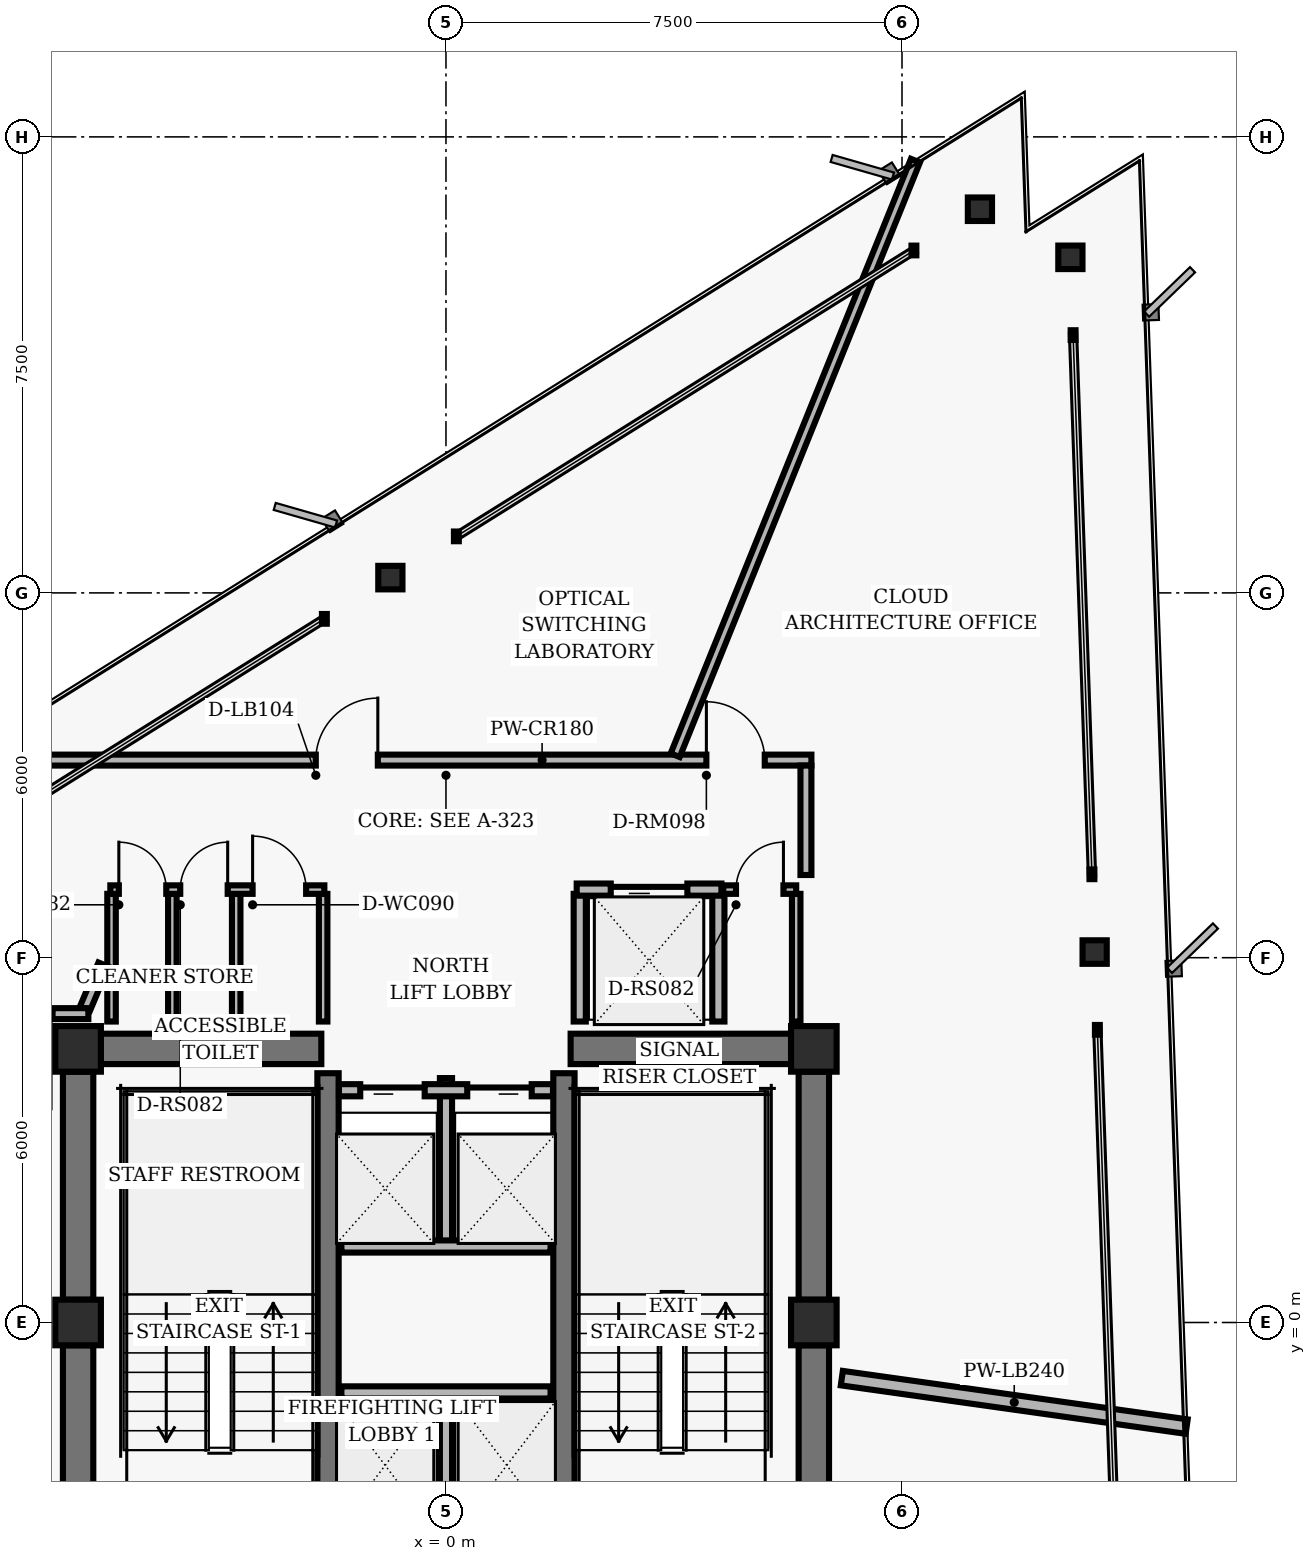
"""IFC4 building model, lengths in metres.
Left out: names, types, materials, properties, quantities, classifications, styles, units other than length and angle.
Written with IfcOpenShell. Run it as: python <this file> out.ifc"""

import sys

from ifc_helpers import new_model, si_unit, direction, frame, frame_2d, origin, origin_2d, place, context, subcontext, project, spatial, rectangle, hollow_rectangle, i_section, extrude, element, fill, save


model = new_model("IFC4")
c1 = context("Model", 3, precision=1e-05, world=origin(), true_north=direction((0.0, 1.0)))
c2 = subcontext(c1, "Body", "Model", "MODEL_VIEW")
j1 = project(units=[si_unit("LENGTHUNIT", "METRE"), si_unit("PLANEANGLEUNIT", "RADIAN")], contexts=[c1])
p1 = place(None, origin())
s1 = spatial("IfcSite", under=j1, at=p1, CompositionType="ELEMENT")
p2 = place(p1, origin())
s2 = spatial("IfcBuilding", under=s1, at=p2, CompositionType="ELEMENT")
p3 = place(p2, frame((0.0, 0.0, 202.72)))
s3 = spatial("IfcBuildingStorey", under=s2, at=p3, CompositionType="ELEMENT", Elevation=202.72)
for number, where, z_axis, x_axis in (
    (1, (-6.05, 4.5, 0.0), (0.0, 0.0, 1.0), (1.0, 0.0, 0.0)),
    (2, (6.05, 4.5, 0.0), (0.0, 0.0, 1.0), (1.0, 0.0, 0.0)),
    (3, (-6.05, 0.0, 0.0), (0.0, 0.0, 1.0), (1.0, 0.0, 0.0)),
    (4, (6.05, 0.0, 0.0), (0.0, 0.0, 1.0), (1.0, 0.0, 0.0)),
):
    element("IfcColumn", number, at=place(p3, frame(where, z_axis=z_axis, x_axis=x_axis)), inside=s3, PredefinedType="COLUMN", context=c2, shape_type="SweptSolid", body=[
        extrude(hollow_rectangle(XDim=0.75, YDim=0.75, WallThickness=0.05, InnerFilletRadius=0.02, OuterFilletRadius=0.04, at=origin_2d()), origin(), (0.0, 0.0, 1.0), 3.04),
    ])
p4 = place(p3, frame((-6.05, 0.375, 0.0), z_axis=(0.0, 0.0, 1.0), x_axis=(0.0, 1.0, 0.0)))
e5 = element("IfcWall", 5, at=p4, inside=s3, PredefinedType="SHEAR", context=c2, shape_type="SweptSolid", body=[
    extrude(rectangle(XDim=3.75, YDim=0.5, at=frame_2d((1.875, 0.0))), origin(), (0.0, 0.0, 1.0), 2.798),
])
p5 = place(p3, frame((-6.05, -3.925, 0.0), z_axis=(0.0, 0.0, 1.0), x_axis=(0.0, 1.0, 0.0)))
e6 = element("IfcWall", 6, at=p5, inside=s3, PredefinedType="SHEAR", context=c2, shape_type="SweptSolid", body=[
    extrude(rectangle(XDim=3.55, YDim=0.5, at=frame_2d((1.775, 0.0))), origin(), (0.0, 0.0, 1.0), 2.798),
])
p6 = place(p3, frame((6.05, 0.375, 0.0), z_axis=(0.0, 0.0, 1.0), x_axis=(0.0, 1.0, 0.0)))
e7 = element("IfcWall", 7, at=p6, inside=s3, PredefinedType="SHEAR", context=c2, shape_type="SweptSolid", body=[
    extrude(rectangle(XDim=3.75, YDim=0.5, at=frame_2d((1.875, 0.0))), origin(), (0.0, 0.0, 1.0), 2.798),
])
p7 = place(p3, frame((6.05, -3.925, 0.0), z_axis=(0.0, 0.0, 1.0), x_axis=(0.0, 1.0, 0.0)))
e8 = element("IfcWall", 8, at=p7, inside=s3, PredefinedType="SHEAR", context=c2, shape_type="SweptSolid", body=[
    extrude(rectangle(XDim=3.55, YDim=0.5, at=frame_2d((1.775, 0.0))), origin(), (0.0, 0.0, 1.0), 2.798),
])
for number, where, z_axis, x_axis in (
    (9, (-1.94, -4.1, 0.0), (0.0, 0.0, 1.0), (0.0, 1.0, 0.0)),
    (10, (1.94, -4.1, 0.0), (0.0, 0.0, 1.0), (0.0, 1.0, 0.0)),
):
    element("IfcWall", number, at=place(p3, frame(where, z_axis=z_axis, x_axis=x_axis)), inside=s3, PredefinedType="SHEAR", context=c2, shape_type="SweptSolid", body=[
        extrude(rectangle(XDim=8.2, YDim=0.35, at=frame_2d((4.1, 0.0))), origin(), (0.0, 0.0, 1.0), 2.798),
    ])
for number, where, z_axis, x_axis in (
    (11, (-5.675, 4.5, 0.0), (0.0, 0.0, 1.0), (1.0, 0.0, 0.0)),
    (12, (2.05, 4.5, 0.0), (0.0, 0.0, 1.0), (1.0, 0.0, 0.0)),
):
    element("IfcWall", number, at=place(p3, frame(where, z_axis=z_axis, x_axis=x_axis)), inside=s3, PredefinedType="SHEAR", context=c2, shape_type="SweptSolid", body=[
        extrude(rectangle(XDim=3.625, YDim=0.5, at=frame_2d((1.812, 0.0))), origin(), (0.0, 0.0, 1.0), 2.798),
    ])
for number, where, z_axis, x_axis in (
    (13, (10.668, 6.093, 0.0), (0.0, 0.0, 1.0), (1.0, 0.0, 0.0)),
    (14, (10.269, 17.519, 0.0), (0.0, 0.0, 1.0), (1.0, 0.0, 0.0)),
    (15, (8.781, 18.31, 0.0), (0.0, 0.0, 1.0), (1.0, 0.0, 0.0)),
    (16, (-0.915, 12.251, 0.0), (0.0, 0.0, 1.0), (1.0, 0.0, 0.0)),
):
    element("IfcColumn", number, at=place(p3, frame(where, z_axis=z_axis, x_axis=x_axis)), inside=s3, PredefinedType="COLUMN", context=c2, shape_type="SweptSolid", body=[
        extrude(i_section(OverallWidth=0.398, OverallDepth=0.387, WebThickness=0.021, FlangeThickness=0.033, FilletRadius=0.018, at=origin_2d()), origin(), (0.0, 0.0, 1.0), 3.04),
    ])
p8 = place(p3, frame((0.0, -3.82, 0.0), z_axis=(0.0, 0.0, 1.0), x_axis=(0.0, 1.0, 0.0)))
e17 = element("IfcWall", 17, at=p8, inside=s3, PredefinedType="PARTITIONING", context=c2, shape_type="SweptSolid", body=[
    extrude(rectangle(XDim=2.67, YDim=0.2, at=frame_2d((1.335, 0.0))), origin(), (0.0, 0.0, 1.0), 2.773),
])
p9 = place(p3, frame((-1.72, -1.15, 0.0), z_axis=(0.0, 0.0, 1.0), x_axis=(1.0, 0.0, 0.0)))
e18 = element("IfcWall", 18, at=p9, inside=s3, PredefinedType="PARTITIONING", context=c2, shape_type="SweptSolid", body=[
    extrude(rectangle(XDim=3.44, YDim=0.2, at=frame_2d((1.72, 0.0))), origin(), (0.0, 0.0, 1.0), 2.773),
])
p10 = place(p3, frame((0.0, 1.25, 0.0), z_axis=(0.0, 0.0, 1.0), x_axis=(0.0, 1.0, 0.0)))
e19 = element("IfcWall", 19, at=p10, inside=s3, PredefinedType="PARTITIONING", context=c2, shape_type="SweptSolid", body=[
    extrude(rectangle(XDim=2.77, YDim=0.2, at=frame_2d((1.385, 0.0))), origin(), (0.0, 0.0, 1.0), 2.773),
])
p11 = place(p3, frame((-1.72, 1.25, 0.0), z_axis=(0.0, 0.0, 1.0), x_axis=(1.0, 0.0, 0.0)))
e20 = element("IfcWall", 20, at=p11, inside=s3, PredefinedType="PARTITIONING", context=c2, shape_type="SweptSolid", body=[
    extrude(rectangle(XDim=3.44, YDim=0.2, at=frame_2d((1.72, 0.0))), origin(), (0.0, 0.0, 1.0), 2.773),
])
p12 = place(p3, frame((-1.76, 3.82, 0.0), z_axis=(0.0, 0.0, 1.0), x_axis=(1.0, 0.0, 0.0)))
e21 = element("IfcWall", 21, at=p12, inside=s3, PredefinedType="PARTITIONING", context=c2, shape_type="SweptSolid", body=[
    extrude(rectangle(XDim=3.52, YDim=0.2, at=frame_2d((1.76, 0.0))), origin(), (0.0, 0.0, 1.0), 2.773),
])
p13 = place(p12, frame((0.35, 0.0, 0.0)))
e22 = element("IfcOpeningElement", 22, at=p13, cuts=e21, PredefinedType="OPENING", context=c2, shape_type="SweptSolid", body=[
    extrude(rectangle(XDim=1.06, YDim=2.04, at=frame_2d((0.53, 1.02))), frame((0.0, 0.11, 0.0), z_axis=(0.0, -1.0, 0.0), x_axis=(1.0, 0.0, 0.0)), (0.0, 0.0, 1.0), 0.22),
])
p14 = place(p12, frame((2.11, 0.0, 0.0)))
e23 = element("IfcOpeningElement", 23, at=p14, cuts=e21, PredefinedType="OPENING", context=c2, shape_type="SweptSolid", body=[
    extrude(rectangle(XDim=1.06, YDim=2.04, at=frame_2d((0.53, 1.02))), frame((0.0, 0.11, 0.0), z_axis=(0.0, -1.0, 0.0), x_axis=(1.0, 0.0, 0.0)), (0.0, 0.0, 1.0), 0.22),
])
for number, where, z_axis, x_axis in (
    (24, (2.2, 4.95, 0.0), (0.0, 0.0, 1.0), (0.0, 1.0, 0.0)),
    (25, (4.48, 4.95, 0.0), (0.0, 0.0, 1.0), (0.0, 1.0, 0.0)),
):
    element("IfcWall", number, at=place(p3, frame(where, z_axis=z_axis, x_axis=x_axis)), inside=s3, PredefinedType="PARTITIONING", context=c2, shape_type="SweptSolid", body=[
        extrude(rectangle(XDim=2.1, YDim=0.2, at=frame_2d((1.05, 0.0))), origin(), (0.0, 0.0, 1.0), 2.773),
    ])
p15 = place(p3, frame((2.15, 7.12, 0.0), z_axis=(0.0, 0.0, 1.0), x_axis=(1.0, 0.0, 0.0)))
e26 = element("IfcWall", 26, at=p15, inside=s3, PredefinedType="PARTITIONING", context=c2, shape_type="SweptSolid", body=[
    extrude(rectangle(XDim=2.38, YDim=0.2, at=frame_2d((1.19, 0.0))), origin(), (0.0, 0.0, 1.0), 2.773),
])
p16 = place(p15, frame((0.56, 0.0, 0.0)))
e27 = element("IfcOpeningElement", 27, at=p16, cuts=e26, PredefinedType="OPENING", context=c2, shape_type="SweptSolid", body=[
    extrude(rectangle(XDim=1.26, YDim=2.06, at=frame_2d((0.63, 1.03))), frame((0.0, 0.11, 0.0), z_axis=(0.0, -1.0, 0.0), x_axis=(1.0, 0.0, 0.0)), (0.0, 0.0, 1.0), 0.22),
])
for number, where, z_axis, x_axis in (
    (28, (-5.5, 4.95, 0.0), (0.0, 0.0, 1.0), (0.0, 1.0, 0.0)),
    (29, (-4.5, 4.95, 0.0), (0.0, 0.0, 1.0), (0.0, 1.0, 0.0)),
    (30, (-3.45, 4.95, 0.0), (0.0, 0.0, 1.0), (0.0, 1.0, 0.0)),
    (31, (-2.02, 4.95, 0.0), (0.0, 0.0, 1.0), (0.0, 1.0, 0.0)),
):
    element("IfcWall", number, at=place(p3, frame(where, z_axis=z_axis, x_axis=x_axis)), inside=s3, PredefinedType="PARTITIONING", context=c2, shape_type="SweptSolid", body=[
        extrude(rectangle(XDim=2.1, YDim=0.14, at=frame_2d((1.05, 0.0))), origin(), (0.0, 0.0, 1.0), 2.773),
    ])
p17 = place(p3, frame((-5.52, 7.12, 0.0), z_axis=(0.0, 0.0, 1.0), x_axis=(1.0, 0.0, 0.0)))
e32 = element("IfcWall", 32, at=p17, inside=s3, PredefinedType="PARTITIONING", context=c2, shape_type="SweptSolid", body=[
    extrude(rectangle(XDim=3.52, YDim=0.14, at=frame_2d((1.76, 0.0))), origin(), (0.0, 0.0, 1.0), 2.773),
])
p18 = place(p17, frame((0.14, 0.0, 0.0)))
e33 = element("IfcOpeningElement", 33, at=p18, cuts=e32, PredefinedType="OPENING", context=c2, shape_type="SweptSolid", body=[
    extrude(rectangle(XDim=0.78, YDim=2.01, at=frame_2d((0.39, 1.005))), frame((0.0, 0.08, 0.0), z_axis=(0.0, -1.0, 0.0), x_axis=(1.0, 0.0, 0.0)), (0.0, 0.0, 1.0), 0.16),
])
p19 = place(p17, frame((1.15, 0.0, 0.0)))
e34 = element("IfcOpeningElement", 34, at=p19, cuts=e32, PredefinedType="OPENING", context=c2, shape_type="SweptSolid", body=[
    extrude(rectangle(XDim=0.78, YDim=2.01, at=frame_2d((0.39, 1.005))), frame((0.0, 0.08, 0.0), z_axis=(0.0, -1.0, 0.0), x_axis=(1.0, 0.0, 0.0)), (0.0, 0.0, 1.0), 0.16),
])
p20 = place(p17, frame((2.34, 0.0, 0.0)))
e35 = element("IfcOpeningElement", 35, at=p20, cuts=e32, PredefinedType="OPENING", context=c2, shape_type="SweptSolid", body=[
    extrude(rectangle(XDim=0.88, YDim=2.02, at=frame_2d((0.44, 1.01))), frame((0.0, 0.08, 0.0), z_axis=(0.0, -1.0, 0.0), x_axis=(1.0, 0.0, 0.0)), (0.0, 0.0, 1.0), 0.16),
])
p21 = place(p3, frame((5.76, 4.95, 0.0), z_axis=(0.0, 0.0, 1.0), x_axis=(0.0, 1.0, 0.0)))
e36 = element("IfcWall", 36, at=p21, inside=s3, PredefinedType="PARTITIONING", context=c2, shape_type="SweptSolid", body=[
    extrude(rectangle(XDim=2.1, YDim=0.14, at=frame_2d((1.05, 0.0))), origin(), (0.0, 0.0, 1.0), 2.253),
])
p22 = place(p3, frame((4.56, 7.12, 0.0), z_axis=(0.0, 0.0, 1.0), x_axis=(1.0, 0.0, 0.0)))
e37 = element("IfcWall", 37, at=p22, inside=s3, PredefinedType="PARTITIONING", context=c2, shape_type="SweptSolid", body=[
    extrude(rectangle(XDim=1.2, YDim=0.14, at=frame_2d((0.6, 0.0))), origin(), (0.0, 0.0, 1.0), 2.773),
])
p23 = place(p22, frame((0.21, 0.0, 0.0)))
e38 = element("IfcOpeningElement", 38, at=p23, cuts=e37, PredefinedType="OPENING", context=c2, shape_type="SweptSolid", body=[
    extrude(rectangle(XDim=0.78, YDim=2.01, at=frame_2d((0.39, 1.005))), frame((0.0, 0.08, 0.0), z_axis=(0.0, -1.0, 0.0), x_axis=(1.0, 0.0, 0.0)), (0.0, 0.0, 1.0), 0.16),
])
p24 = place(p3, frame((-7.29, 9.25, 0.0), z_axis=(0.0, 0.0, 1.0), x_axis=(1.0, 0.0, 0.0)))
e39 = element("IfcWall", 39, at=p24, inside=s3, PredefinedType="PARTITIONING", context=c2, shape_type="SweptSolid", body=[
    extrude(rectangle(XDim=13.3, YDim=0.18, at=frame_2d((6.65, 0.0))), origin(), (0.0, 0.0, 1.0), 2.773),
])
p25 = place(p24, frame((11.573, 0.0, 0.0)))
e40 = element("IfcOpeningElement", 40, at=p25, cuts=e39, PredefinedType="OPENING", context=c2, shape_type="SweptSolid", body=[
    extrude(rectangle(XDim=0.96, YDim=2.02, at=frame_2d((0.48, 1.01))), frame((0.0, 0.1, 0.0), z_axis=(0.0, -1.0, 0.0), x_axis=(1.0, 0.0, 0.0)), (0.0, 0.0, 1.0), 0.2),
])
p26 = place(p24, frame((5.149, 0.0, 0.0)))
e41 = element("IfcOpeningElement", 41, at=p26, cuts=e39, PredefinedType="OPENING", context=c2, shape_type="SweptSolid", body=[
    extrude(rectangle(XDim=1.02, YDim=2.02, at=frame_2d((0.51, 1.01))), frame((0.0, 0.1, 0.0), z_axis=(0.0, -1.0, 0.0), x_axis=(1.0, 0.0, 0.0)), (0.0, 0.0, 1.0), 0.2),
])
p27 = place(p3, frame((5.92, 9.16, 0.0), z_axis=(0.0, 0.0, 1.0), x_axis=(0.0, -1.0, 0.0)))
e42 = element("IfcWall", 42, at=p27, inside=s3, PredefinedType="PARTITIONING", context=c2, shape_type="SweptSolid", body=[
    extrude(rectangle(XDim=1.8, YDim=0.18, at=frame_2d((0.9, 0.0))), origin(), (0.0, 0.0, 1.0), 2.773),
])
p28 = place(p3, frame((-5.632, 5.887, 0.0), z_axis=(0.0, 0.0, 1.0), x_axis=(-0.387792833522, -0.921746558588, 0.0)))
e43 = element("IfcWall", 43, at=p28, inside=s3, PredefinedType="PARTITIONING", context=c2, shape_type="SweptSolid", body=[
    extrude(rectangle(XDim=0.785, YDim=0.18, at=frame_2d((0.393, 0.0))), origin(), (0.0, 0.0, 1.0), 2.773),
])
p29 = place(p3, frame((-5.881, 5.08, 0.0), z_axis=(0.0, 0.0, 1.0), x_axis=(-1.0, 0.0, 0.0)))
e44 = element("IfcWall", 44, at=p29, inside=s3, PredefinedType="PARTITIONING", context=c2, shape_type="SweptSolid", body=[
    extrude(rectangle(XDim=0.589, YDim=0.18, at=frame_2d((0.294, 0.0))), origin(), (0.0, 0.0, 1.0), 2.773),
])
p30 = place(p3, frame((6.51, -0.915, 0.0), z_axis=(0.0, 0.0, 1.0), x_axis=(0.990267505523, -0.139177108413, 0.0)))
e45 = element("IfcWall", 45, at=p30, inside=s3, PredefinedType="PARTITIONING", context=c2, shape_type="SweptSolid", body=[
    extrude(rectangle(XDim=5.727, YDim=0.24, at=frame_2d((2.864, 0.0))), origin(), (0.0, 0.0, 1.0), 2.773),
])
p31 = place(p3, frame((3.77, 9.33, 0.0), z_axis=(0.0, 0.0, 1.0), x_axis=(0.374613070454, 0.927181237647, 0.0)))
e46 = element("IfcWall", 46, at=p31, inside=s3, PredefinedType="PARTITIONING", context=c2, shape_type="SweptSolid", body=[
    extrude(rectangle(XDim=10.547, YDim=0.16, at=frame_2d((5.274, 0.0))), origin(), (0.0, 0.0, 1.0), 2.773),
])
p32 = place(p13, origin())
e47 = element("IfcDoor", 47, at=p32, inside=s3, OperationType="SLIDING_TO_LEFT", PredefinedType="DOOR", context=c2, shape_type="SweptSolid", body=[
    extrude(rectangle(XDim=1.06, YDim=2.04, at=frame_2d((0.53, 1.02))), frame((0.0, 0.025, 0.0), z_axis=(0.0, -1.0, 0.0), x_axis=(1.0, 0.0, 0.0)), (0.0, 0.0, 1.0), 0.05),
])
fill(e22, e47)
p33 = place(p14, origin())
e48 = element("IfcDoor", 48, at=p33, inside=s3, OperationType="SLIDING_TO_RIGHT", PredefinedType="DOOR", context=c2, shape_type="SweptSolid", body=[
    extrude(rectangle(XDim=1.06, YDim=2.04, at=frame_2d((0.53, 1.02))), frame((0.0, 0.025, 0.0), z_axis=(0.0, -1.0, 0.0), x_axis=(1.0, 0.0, 0.0)), (0.0, 0.0, 1.0), 0.05),
])
fill(e23, e48)
p34 = place(p16, origin())
e49 = element("IfcDoor", 49, at=p34, inside=s3, OperationType="SLIDING_TO_LEFT", PredefinedType="DOOR", context=c2, shape_type="SweptSolid", body=[
    extrude(rectangle(XDim=1.26, YDim=2.06, at=frame_2d((0.63, 1.03))), frame((0.0, 0.025, 0.0), z_axis=(0.0, -1.0, 0.0), x_axis=(1.0, 0.0, 0.0)), (0.0, 0.0, 1.0), 0.05),
])
fill(e27, e49)
p35 = place(p18, origin())
e50 = element("IfcDoor", 50, at=p35, inside=s3, OperationType="SINGLE_SWING_LEFT", PredefinedType="DOOR", context=c2, shape_type="SweptSolid", body=[
    extrude(rectangle(XDim=0.78, YDim=2.01, at=frame_2d((0.39, 1.005))), frame((0.0, 0.025, 0.0), z_axis=(0.0, -1.0, 0.0), x_axis=(1.0, 0.0, 0.0)), (0.0, 0.0, 1.0), 0.05),
])
fill(e33, e50)
p36 = place(p19, origin())
e51 = element("IfcDoor", 51, at=p36, inside=s3, OperationType="SINGLE_SWING_RIGHT", PredefinedType="DOOR", context=c2, shape_type="SweptSolid", body=[
    extrude(rectangle(XDim=0.78, YDim=2.01, at=frame_2d((0.39, 1.005))), frame((0.0, 0.025, 0.0), z_axis=(0.0, -1.0, 0.0), x_axis=(1.0, 0.0, 0.0)), (0.0, 0.0, 1.0), 0.05),
])
fill(e34, e51)
p37 = place(p20, origin())
e52 = element("IfcDoor", 52, at=p37, inside=s3, OperationType="SINGLE_SWING_LEFT", PredefinedType="DOOR", context=c2, shape_type="SweptSolid", body=[
    extrude(rectangle(XDim=0.88, YDim=2.02, at=frame_2d((0.44, 1.01))), frame((0.0, 0.025, 0.0), z_axis=(0.0, -1.0, 0.0), x_axis=(1.0, 0.0, 0.0)), (0.0, 0.0, 1.0), 0.05),
])
fill(e35, e52)
p38 = place(p23, origin())
e53 = element("IfcDoor", 53, at=p38, inside=s3, OperationType="SINGLE_SWING_RIGHT", PredefinedType="DOOR", context=c2, shape_type="SweptSolid", body=[
    extrude(rectangle(XDim=0.78, YDim=2.01, at=frame_2d((0.39, 1.005))), frame((0.0, 0.025, 0.0), z_axis=(0.0, -1.0, 0.0), x_axis=(1.0, 0.0, 0.0)), (0.0, 0.0, 1.0), 0.05),
])
fill(e38, e53)
p39 = place(p25, origin())
e54 = element("IfcDoor", 54, at=p39, inside=s3, OperationType="SINGLE_SWING_LEFT", PredefinedType="DOOR", context=c2, shape_type="SweptSolid", body=[
    extrude(rectangle(XDim=0.96, YDim=2.02, at=frame_2d((0.48, 1.01))), frame((0.0, 0.025, 0.0), z_axis=(0.0, -1.0, 0.0), x_axis=(1.0, 0.0, 0.0)), (0.0, 0.0, 1.0), 0.05),
])
fill(e40, e54)
p40 = place(p26, origin())
e55 = element("IfcDoor", 55, at=p40, inside=s3, OperationType="SINGLE_SWING_RIGHT", PredefinedType="DOOR", context=c2, shape_type="SweptSolid", body=[
    extrude(rectangle(XDim=1.02, YDim=2.02, at=frame_2d((0.51, 1.01))), frame((0.0, 0.025, 0.0), z_axis=(0.0, -1.0, 0.0), x_axis=(1.0, 0.0, 0.0)), (0.0, 0.0, 1.0), 0.05),
])
fill(e41, e55)
save(model, sys.argv[1])
